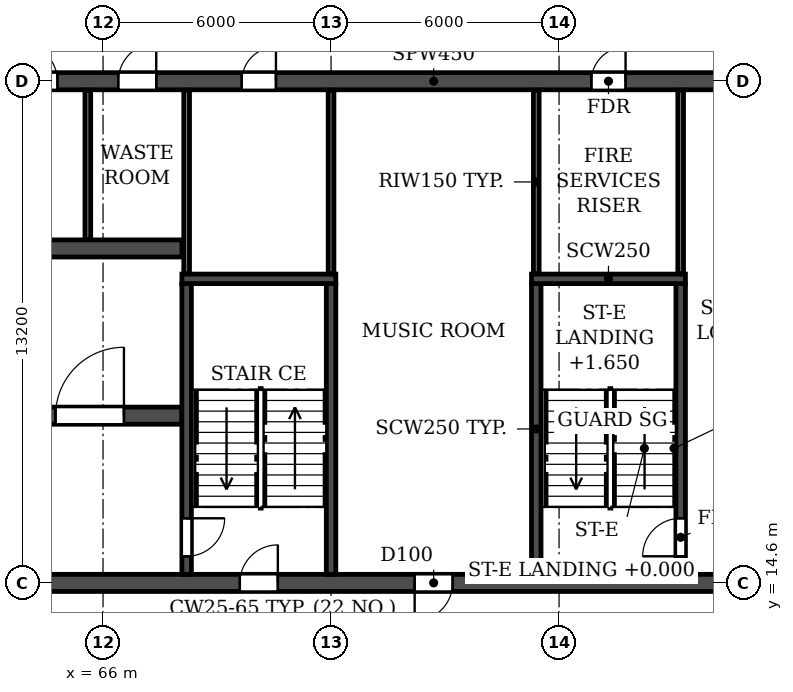
"""IFC4 building model, lengths in metres.
Left out: names, types, materials, properties, quantities, classifications, styles, units other than length and angle.
Written with IfcOpenShell. Run it as: python <this file> out.ifc"""

import sys

from ifc_helpers import new_model, si_unit, direction, frame, frame_2d, origin, place, context, subcontext, project, spatial, rectangle, extrude, element, fill, save


model = new_model("IFC4")
c1 = context("Model", 3, precision=1e-05, world=origin(), true_north=direction((0.0, 1.0)))
c2 = subcontext(c1, "Body", "Model", "MODEL_VIEW")
j1 = project(units=[si_unit("LENGTHUNIT", "METRE"), si_unit("PLANEANGLEUNIT", "RADIAN")], contexts=[c1])
p1 = place(None, origin())
s1 = spatial("IfcSite", under=j1, at=p1, CompositionType="ELEMENT")
p2 = place(p1, origin())
s2 = spatial("IfcBuilding", under=s1, at=p2, CompositionType="ELEMENT")
p3 = place(p2, frame((0.0, 0.0, 155.4)))
s3 = spatial("IfcBuildingStorey", under=s2, at=p3, CompositionType="ELEMENT", Elevation=155.4)
p4 = place(p3, frame((12.2, 14.6, 0.0), z_axis=(0.0, 0.0, 1.0), x_axis=(1.0, 0.0, 0.0)))
e1 = element("IfcWall", 1, at=p4, inside=s3, PredefinedType="SOLIDWALL", context=c2, shape_type="SweptSolid", body=[
    extrude(rectangle(XDim=77.6, YDim=0.45, at=frame_2d((38.8, 0.0))), origin(), (0.0, 0.0, 1.0), 3.0),
])
p5 = place(p4, frame((2.3, 0.0, 0.0)))
e2 = element("IfcOpeningElement", 2, at=p5, cuts=e1, PredefinedType="OPENING", context=c2, shape_type="SweptSolid", body=[
    extrude(rectangle(XDim=1.0, YDim=2.1, at=frame_2d((0.5, 1.05))), frame((0.0, 0.235, 0.0), z_axis=(0.0, -1.0, 0.0), x_axis=(1.0, 0.0, 0.0)), (0.0, 0.0, 1.0), 0.47),
])
p6 = place(p4, frame((6.7, 0.0, 0.0)))
e3 = element("IfcOpeningElement", 3, at=p6, cuts=e1, PredefinedType="OPENING", context=c2, shape_type="SweptSolid", body=[
    extrude(rectangle(XDim=1.0, YDim=2.1, at=frame_2d((0.5, 1.05))), frame((0.0, 0.235, 0.0), z_axis=(0.0, -1.0, 0.0), x_axis=(1.0, 0.0, 0.0)), (0.0, 0.0, 1.0), 0.47),
])
p7 = place(p4, frame((14.6, 0.0, 0.0)))
e4 = element("IfcOpeningElement", 4, at=p7, cuts=e1, PredefinedType="OPENING", context=c2, shape_type="SweptSolid", body=[
    extrude(rectangle(XDim=1.0, YDim=2.1, at=frame_2d((0.5, 1.05))), frame((0.0, 0.235, 0.0), z_axis=(0.0, -1.0, 0.0), x_axis=(1.0, 0.0, 0.0)), (0.0, 0.0, 1.0), 0.47),
])
p8 = place(p4, frame((19.2, 0.0, 0.0)))
e5 = element("IfcOpeningElement", 5, at=p8, cuts=e1, PredefinedType="OPENING", context=c2, shape_type="SweptSolid", body=[
    extrude(rectangle(XDim=1.0, YDim=2.1, at=frame_2d((0.5, 1.05))), frame((0.0, 0.235, 0.0), z_axis=(0.0, -1.0, 0.0), x_axis=(1.0, 0.0, 0.0)), (0.0, 0.0, 1.0), 0.47),
])
p9 = place(p4, frame((30.5, 0.0, 0.0)))
e6 = element("IfcOpeningElement", 6, at=p9, cuts=e1, PredefinedType="OPENING", context=c2, shape_type="SweptSolid", body=[
    extrude(rectangle(XDim=1.0, YDim=2.1, at=frame_2d((0.5, 1.05))), frame((0.0, 0.235, 0.0), z_axis=(0.0, -1.0, 0.0), x_axis=(1.0, 0.0, 0.0)), (0.0, 0.0, 1.0), 0.47),
])
p10 = place(p4, frame((34.15, 0.0, 0.0)))
e7 = element("IfcOpeningElement", 7, at=p10, cuts=e1, PredefinedType="OPENING", context=c2, shape_type="SweptSolid", body=[
    extrude(rectangle(XDim=1.5, YDim=2.1, at=frame_2d((0.75, 1.05))), frame((0.0, 0.235, 0.0), z_axis=(0.0, -1.0, 0.0), x_axis=(1.0, 0.0, 0.0)), (0.0, 0.0, 1.0), 0.47),
])
p11 = place(p4, frame((38.3, 0.0, 0.0)))
e8 = element("IfcOpeningElement", 8, at=p11, cuts=e1, PredefinedType="OPENING", context=c2, shape_type="SweptSolid", body=[
    extrude(rectangle(XDim=1.0, YDim=2.1, at=frame_2d((0.5, 1.05))), frame((0.0, 0.235, 0.0), z_axis=(0.0, -1.0, 0.0), x_axis=(1.0, 0.0, 0.0)), (0.0, 0.0, 1.0), 0.47),
])
p12 = place(p4, frame((43.5, 0.0, 0.0)))
e9 = element("IfcOpeningElement", 9, at=p12, cuts=e1, PredefinedType="OPENING", context=c2, shape_type="SweptSolid", body=[
    extrude(rectangle(XDim=1.0, YDim=2.1, at=frame_2d((0.5, 1.05))), frame((0.0, 0.235, 0.0), z_axis=(0.0, -1.0, 0.0), x_axis=(1.0, 0.0, 0.0)), (0.0, 0.0, 1.0), 0.47),
])
p13 = place(p4, frame((57.4, 0.0, 0.0)))
e10 = element("IfcOpeningElement", 10, at=p13, cuts=e1, PredefinedType="OPENING", context=c2, shape_type="SweptSolid", body=[
    extrude(rectangle(XDim=1.0, YDim=2.1, at=frame_2d((0.5, 1.05))), frame((0.0, 0.235, 0.0), z_axis=(0.0, -1.0, 0.0), x_axis=(1.0, 0.0, 0.0)), (0.0, 0.0, 1.0), 0.47),
])
p14 = place(p4, frame((62.0, 0.0, 0.0)))
e11 = element("IfcOpeningElement", 11, at=p14, cuts=e1, PredefinedType="OPENING", context=c2, shape_type="SweptSolid", body=[
    extrude(rectangle(XDim=1.0, YDim=2.1, at=frame_2d((0.5, 1.05))), frame((0.0, 0.235, 0.0), z_axis=(0.0, -1.0, 0.0), x_axis=(1.0, 0.0, 0.0)), (0.0, 0.0, 1.0), 0.47),
])
p15 = place(p4, frame((69.9, 0.0, 0.0)))
e12 = element("IfcOpeningElement", 12, at=p15, cuts=e1, PredefinedType="OPENING", context=c2, shape_type="SweptSolid", body=[
    extrude(rectangle(XDim=1.0, YDim=2.1, at=frame_2d((0.5, 1.05))), frame((0.0, 0.235, 0.0), z_axis=(0.0, -1.0, 0.0), x_axis=(1.0, 0.0, 0.0)), (0.0, 0.0, 1.0), 0.47),
])
p16 = place(p4, frame((74.3, 0.0, 0.0)))
e13 = element("IfcOpeningElement", 13, at=p16, cuts=e1, PredefinedType="OPENING", context=c2, shape_type="SweptSolid", body=[
    extrude(rectangle(XDim=1.0, YDim=2.1, at=frame_2d((0.5, 1.05))), frame((0.0, 0.235, 0.0), z_axis=(0.0, -1.0, 0.0), x_axis=(1.0, 0.0, 0.0)), (0.0, 0.0, 1.0), 0.47),
])
p17 = place(p3, frame((12.2, 27.8, 0.0), z_axis=(0.0, 0.0, 1.0), x_axis=(1.0, 0.0, 0.0)))
e14 = element("IfcWall", 14, at=p17, inside=s3, PredefinedType="SOLIDWALL", context=c2, shape_type="SweptSolid", body=[
    extrude(rectangle(XDim=77.6, YDim=0.45, at=frame_2d((38.8, 0.0))), origin(), (0.0, 0.0, 1.0), 3.0),
])
p18 = place(p17, frame((2.3, 0.0, 0.0)))
e15 = element("IfcOpeningElement", 15, at=p18, cuts=e14, PredefinedType="OPENING", context=c2, shape_type="SweptSolid", body=[
    extrude(rectangle(XDim=1.0, YDim=2.1, at=frame_2d((0.5, 1.05))), frame((0.0, 0.235, 0.0), z_axis=(0.0, -1.0, 0.0), x_axis=(1.0, 0.0, 0.0)), (0.0, 0.0, 1.0), 0.47),
])
p19 = place(p17, frame((6.7, 0.0, 0.0)))
e16 = element("IfcOpeningElement", 16, at=p19, cuts=e14, PredefinedType="OPENING", context=c2, shape_type="SweptSolid", body=[
    extrude(rectangle(XDim=1.0, YDim=2.1, at=frame_2d((0.5, 1.05))), frame((0.0, 0.235, 0.0), z_axis=(0.0, -1.0, 0.0), x_axis=(1.0, 0.0, 0.0)), (0.0, 0.0, 1.0), 0.47),
])
p20 = place(p17, frame((10.05, 0.0, 0.0)))
e17 = element("IfcOpeningElement", 17, at=p20, cuts=e14, PredefinedType="OPENING", context=c2, shape_type="SweptSolid", body=[
    extrude(rectangle(XDim=0.9, YDim=2.1, at=frame_2d((0.45, 1.05))), frame((0.0, 0.235, 0.0), z_axis=(0.0, -1.0, 0.0), x_axis=(1.0, 0.0, 0.0)), (0.0, 0.0, 1.0), 0.47),
])
p21 = place(p17, frame((19.25, 0.0, 0.0)))
e18 = element("IfcOpeningElement", 18, at=p21, cuts=e14, PredefinedType="OPENING", context=c2, shape_type="SweptSolid", body=[
    extrude(rectangle(XDim=0.9, YDim=2.1, at=frame_2d((0.45, 1.05))), frame((0.0, 0.235, 0.0), z_axis=(0.0, -1.0, 0.0), x_axis=(1.0, 0.0, 0.0)), (0.0, 0.0, 1.0), 0.47),
])
p22 = place(p17, frame((22.4, 0.0, 0.0)))
e19 = element("IfcOpeningElement", 19, at=p22, cuts=e14, PredefinedType="OPENING", context=c2, shape_type="SweptSolid", body=[
    extrude(rectangle(XDim=1.0, YDim=2.1, at=frame_2d((0.5, 1.05))), frame((0.0, 0.235, 0.0), z_axis=(0.0, -1.0, 0.0), x_axis=(1.0, 0.0, 0.0)), (0.0, 0.0, 1.0), 0.47),
])
p23 = place(p17, frame((27.6, 0.0, 0.0)))
e20 = element("IfcOpeningElement", 20, at=p23, cuts=e14, PredefinedType="OPENING", context=c2, shape_type="SweptSolid", body=[
    extrude(rectangle(XDim=1.0, YDim=2.1, at=frame_2d((0.5, 1.05))), frame((0.0, 0.235, 0.0), z_axis=(0.0, -1.0, 0.0), x_axis=(1.0, 0.0, 0.0)), (0.0, 0.0, 1.0), 0.47),
])
p24 = place(p17, frame((35.4, 0.0, 0.0)))
e21 = element("IfcOpeningElement", 21, at=p24, cuts=e14, PredefinedType="OPENING", context=c2, shape_type="SweptSolid", body=[
    extrude(rectangle(XDim=1.0, YDim=2.1, at=frame_2d((0.5, 1.05))), frame((0.0, 0.235, 0.0), z_axis=(0.0, -1.0, 0.0), x_axis=(1.0, 0.0, 0.0)), (0.0, 0.0, 1.0), 0.47),
])
p25 = place(p17, frame((38.3, 0.0, 0.0)))
e22 = element("IfcOpeningElement", 22, at=p25, cuts=e14, PredefinedType="OPENING", context=c2, shape_type="SweptSolid", body=[
    extrude(rectangle(XDim=1.0, YDim=2.1, at=frame_2d((0.5, 1.05))), frame((0.0, 0.235, 0.0), z_axis=(0.0, -1.0, 0.0), x_axis=(1.0, 0.0, 0.0)), (0.0, 0.0, 1.0), 0.47),
])
p26 = place(p17, frame((42.25, 0.0, 0.0)))
e23 = element("IfcOpeningElement", 23, at=p26, cuts=e14, PredefinedType="OPENING", context=c2, shape_type="SweptSolid", body=[
    extrude(rectangle(XDim=1.5, YDim=2.1, at=frame_2d((0.75, 1.05))), frame((0.0, 0.235, 0.0), z_axis=(0.0, -1.0, 0.0), x_axis=(1.0, 0.0, 0.0)), (0.0, 0.0, 1.0), 0.47),
])
p27 = place(p17, frame((47.7, 0.0, 0.0)))
e24 = element("IfcOpeningElement", 24, at=p27, cuts=e14, PredefinedType="OPENING", context=c2, shape_type="SweptSolid", body=[
    extrude(rectangle(XDim=1.0, YDim=2.1, at=frame_2d((0.5, 1.05))), frame((0.0, 0.235, 0.0), z_axis=(0.0, -1.0, 0.0), x_axis=(1.0, 0.0, 0.0)), (0.0, 0.0, 1.0), 0.47),
])
p28 = place(p17, frame((51.6, 0.0, 0.0)))
e25 = element("IfcOpeningElement", 25, at=p28, cuts=e14, PredefinedType="OPENING", context=c2, shape_type="SweptSolid", body=[
    extrude(rectangle(XDim=1.0, YDim=2.1, at=frame_2d((0.5, 1.05))), frame((0.0, 0.235, 0.0), z_axis=(0.0, -1.0, 0.0), x_axis=(1.0, 0.0, 0.0)), (0.0, 0.0, 1.0), 0.47),
])
p29 = place(p17, frame((54.2, 0.0, 0.0)))
e26 = element("IfcOpeningElement", 26, at=p29, cuts=e14, PredefinedType="OPENING", context=c2, shape_type="SweptSolid", body=[
    extrude(rectangle(XDim=1.0, YDim=2.1, at=frame_2d((0.5, 1.05))), frame((0.0, 0.235, 0.0), z_axis=(0.0, -1.0, 0.0), x_axis=(1.0, 0.0, 0.0)), (0.0, 0.0, 1.0), 0.47),
])
p30 = place(p17, frame((57.45, 0.0, 0.0)))
e27 = element("IfcOpeningElement", 27, at=p30, cuts=e14, PredefinedType="OPENING", context=c2, shape_type="SweptSolid", body=[
    extrude(rectangle(XDim=0.9, YDim=2.1, at=frame_2d((0.45, 1.05))), frame((0.0, 0.235, 0.0), z_axis=(0.0, -1.0, 0.0), x_axis=(1.0, 0.0, 0.0)), (0.0, 0.0, 1.0), 0.47),
])
p31 = place(p17, frame((66.65, 0.0, 0.0)))
e28 = element("IfcOpeningElement", 28, at=p31, cuts=e14, PredefinedType="OPENING", context=c2, shape_type="SweptSolid", body=[
    extrude(rectangle(XDim=0.9, YDim=2.1, at=frame_2d((0.45, 1.05))), frame((0.0, 0.235, 0.0), z_axis=(0.0, -1.0, 0.0), x_axis=(1.0, 0.0, 0.0)), (0.0, 0.0, 1.0), 0.47),
])
p32 = place(p17, frame((69.9, 0.0, 0.0)))
e29 = element("IfcOpeningElement", 29, at=p32, cuts=e14, PredefinedType="OPENING", context=c2, shape_type="SweptSolid", body=[
    extrude(rectangle(XDim=1.0, YDim=2.1, at=frame_2d((0.5, 1.05))), frame((0.0, 0.235, 0.0), z_axis=(0.0, -1.0, 0.0), x_axis=(1.0, 0.0, 0.0)), (0.0, 0.0, 1.0), 0.47),
])
p33 = place(p17, frame((74.3, 0.0, 0.0)))
e30 = element("IfcOpeningElement", 30, at=p33, cuts=e14, PredefinedType="OPENING", context=c2, shape_type="SweptSolid", body=[
    extrude(rectangle(XDim=1.0, YDim=2.1, at=frame_2d((0.5, 1.05))), frame((0.0, 0.235, 0.0), z_axis=(0.0, -1.0, 0.0), x_axis=(1.0, 0.0, 0.0)), (0.0, 0.0, 1.0), 0.47),
])
p34 = place(p3, frame((33.925, 19.0, 0.0), z_axis=(0.0, 0.0, 1.0), x_axis=(1.0, 0.0, 0.0)))
e31 = element("IfcWall", 31, at=p34, inside=s3, PredefinedType="SOLIDWALL", context=c2, shape_type="SweptSolid", body=[
    extrude(rectangle(XDim=34.15, YDim=0.45, at=frame_2d((17.075, 0.0))), origin(), (0.0, 0.0, 1.0), 3.0),
])
p35 = place(p34, frame((16.175, 0.0, 0.0)))
e32 = element("IfcOpeningElement", 32, at=p35, cuts=e31, PredefinedType="OPENING", context=c2, shape_type="SweptSolid", body=[
    extrude(rectangle(XDim=1.8, YDim=2.1, at=frame_2d((0.9, 1.05))), frame((0.0, 0.235, 0.0), z_axis=(0.0, -1.0, 0.0), x_axis=(1.0, 0.0, 0.0)), (0.0, 0.0, 1.0), 0.47),
])
p36 = place(p34, frame((1.525, 0.0, 0.0)))
e33 = element("IfcOpeningElement", 33, at=p36, cuts=e31, PredefinedType="OPENING", context=c2, shape_type="SweptSolid", body=[
    extrude(rectangle(XDim=1.8, YDim=2.1, at=frame_2d((0.9, 1.05))), frame((0.0, 0.235, 0.0), z_axis=(0.0, -1.0, 0.0), x_axis=(1.0, 0.0, 0.0)), (0.0, 0.0, 1.0), 0.47),
])
p37 = place(p34, frame((30.825, 0.0, 0.0)))
e34 = element("IfcOpeningElement", 34, at=p37, cuts=e31, PredefinedType="OPENING", context=c2, shape_type="SweptSolid", body=[
    extrude(rectangle(XDim=1.8, YDim=2.1, at=frame_2d((0.9, 1.05))), frame((0.0, 0.235, 0.0), z_axis=(0.0, -1.0, 0.0), x_axis=(1.0, 0.0, 0.0)), (0.0, 0.0, 1.0), 0.47),
])
p38 = place(p3, frame((33.925, 23.4, 0.0), z_axis=(0.0, 0.0, 1.0), x_axis=(1.0, 0.0, 0.0)))
e35 = element("IfcWall", 35, at=p38, inside=s3, PredefinedType="SOLIDWALL", context=c2, shape_type="SweptSolid", body=[
    extrude(rectangle(XDim=34.15, YDim=0.45, at=frame_2d((17.075, 0.0))), origin(), (0.0, 0.0, 1.0), 3.0),
])
p39 = place(p38, frame((16.175, 0.0, 0.0)))
e36 = element("IfcOpeningElement", 36, at=p39, cuts=e35, PredefinedType="OPENING", context=c2, shape_type="SweptSolid", body=[
    extrude(rectangle(XDim=1.8, YDim=2.1, at=frame_2d((0.9, 1.05))), frame((0.0, 0.235, 0.0), z_axis=(0.0, -1.0, 0.0), x_axis=(1.0, 0.0, 0.0)), (0.0, 0.0, 1.0), 0.47),
])
p40 = place(p38, frame((0.625, 0.0, 0.0)))
e37 = element("IfcOpeningElement", 37, at=p40, cuts=e35, PredefinedType="OPENING", context=c2, shape_type="SweptSolid", body=[
    extrude(rectangle(XDim=1.1, YDim=2.1, at=frame_2d((0.55, 1.05))), frame((0.0, 0.235, 0.0), z_axis=(0.0, -1.0, 0.0), x_axis=(1.0, 0.0, 0.0)), (0.0, 0.0, 1.0), 0.47),
])
p41 = place(p38, frame((3.225, 0.0, 0.0)))
e38 = element("IfcOpeningElement", 38, at=p41, cuts=e35, PredefinedType="OPENING", context=c2, shape_type="SweptSolid", body=[
    extrude(rectangle(XDim=1.1, YDim=2.1, at=frame_2d((0.55, 1.05))), frame((0.0, 0.235, 0.0), z_axis=(0.0, -1.0, 0.0), x_axis=(1.0, 0.0, 0.0)), (0.0, 0.0, 1.0), 0.47),
])
p42 = place(p38, frame((5.825, 0.0, 0.0)))
e39 = element("IfcOpeningElement", 39, at=p42, cuts=e35, PredefinedType="OPENING", context=c2, shape_type="SweptSolid", body=[
    extrude(rectangle(XDim=1.1, YDim=2.1, at=frame_2d((0.55, 1.05))), frame((0.0, 0.235, 0.0), z_axis=(0.0, -1.0, 0.0), x_axis=(1.0, 0.0, 0.0)), (0.0, 0.0, 1.0), 0.47),
])
p43 = place(p38, frame((8.425, 0.0, 0.0)))
e40 = element("IfcOpeningElement", 40, at=p43, cuts=e35, PredefinedType="OPENING", context=c2, shape_type="SweptSolid", body=[
    extrude(rectangle(XDim=1.1, YDim=2.1, at=frame_2d((0.55, 1.05))), frame((0.0, 0.235, 0.0), z_axis=(0.0, -1.0, 0.0), x_axis=(1.0, 0.0, 0.0)), (0.0, 0.0, 1.0), 0.47),
])
p44 = place(p38, frame((11.025, 0.0, 0.0)))
e41 = element("IfcOpeningElement", 41, at=p44, cuts=e35, PredefinedType="OPENING", context=c2, shape_type="SweptSolid", body=[
    extrude(rectangle(XDim=1.1, YDim=2.1, at=frame_2d((0.55, 1.05))), frame((0.0, 0.235, 0.0), z_axis=(0.0, -1.0, 0.0), x_axis=(1.0, 0.0, 0.0)), (0.0, 0.0, 1.0), 0.47),
])
p45 = place(p38, frame((13.625, 0.0, 0.0)))
e42 = element("IfcOpeningElement", 42, at=p45, cuts=e35, PredefinedType="OPENING", context=c2, shape_type="SweptSolid", body=[
    extrude(rectangle(XDim=1.1, YDim=2.1, at=frame_2d((0.55, 1.05))), frame((0.0, 0.235, 0.0), z_axis=(0.0, -1.0, 0.0), x_axis=(1.0, 0.0, 0.0)), (0.0, 0.0, 1.0), 0.47),
])
p46 = place(p38, frame((27.225, 0.0, 0.0)))
e43 = element("IfcOpeningElement", 43, at=p46, cuts=e35, PredefinedType="OPENING", context=c2, shape_type="SweptSolid", body=[
    extrude(rectangle(XDim=1.1, YDim=2.1, at=frame_2d((0.55, 1.05))), frame((0.0, 0.235, 0.0), z_axis=(0.0, -1.0, 0.0), x_axis=(1.0, 0.0, 0.0)), (0.0, 0.0, 1.0), 0.47),
])
p47 = place(p3, frame((68.2, 14.825, 0.0), z_axis=(0.0, 0.0, 1.0), x_axis=(0.0, 1.0, 0.0)))
e44 = element("IfcWall", 44, at=p47, inside=s3, PredefinedType="SOLIDWALL", context=c2, shape_type="SweptSolid", body=[
    extrude(rectangle(XDim=7.65, YDim=0.25, at=frame_2d((3.825, 0.0))), origin(), (0.0, 0.0, 1.0), 3.0),
])
p48 = place(p47, frame((0.475, 0.0, 0.0)))
e45 = element("IfcOpeningElement", 45, at=p48, cuts=e44, PredefinedType="OPENING", context=c2, shape_type="SweptSolid", body=[
    extrude(rectangle(XDim=1.0, YDim=2.1, at=frame_2d((0.5, 1.05))), frame((0.0, 0.135, 0.0), z_axis=(0.0, -1.0, 0.0), x_axis=(1.0, 0.0, 0.0)), (0.0, 0.0, 1.0), 0.27),
])
p49 = place(p3, frame((72.0, 14.825, 0.0), z_axis=(0.0, 0.0, 1.0), x_axis=(0.0, 1.0, 0.0)))
e46 = element("IfcWall", 46, at=p49, inside=s3, PredefinedType="SOLIDWALL", context=c2, shape_type="SweptSolid", body=[
    extrude(rectangle(XDim=7.65, YDim=0.25, at=frame_2d((3.825, 0.0))), origin(), (0.0, 0.0, 1.0), 3.0),
])
p50 = place(p3, frame((68.075, 22.6, 0.0), z_axis=(0.0, 0.0, 1.0), x_axis=(1.0, 0.0, 0.0)))
e47 = element("IfcWall", 47, at=p50, inside=s3, PredefinedType="SOLIDWALL", context=c2, shape_type="SweptSolid", body=[
    extrude(rectangle(XDim=4.05, YDim=0.25, at=frame_2d((2.025, 0.0))), origin(), (0.0, 0.0, 1.0), 3.0),
])
p51 = place(p3, frame((77.4, 14.825, 0.0), z_axis=(0.0, 0.0, 1.0), x_axis=(0.0, 1.0, 0.0)))
e48 = element("IfcWall", 48, at=p51, inside=s3, PredefinedType="SOLIDWALL", context=c2, shape_type="SweptSolid", body=[
    extrude(rectangle(XDim=7.65, YDim=0.25, at=frame_2d((3.825, 0.0))), origin(), (0.0, 0.0, 1.0), 3.0),
])
p52 = place(p3, frame((81.2, 14.825, 0.0), z_axis=(0.0, 0.0, 1.0), x_axis=(0.0, 1.0, 0.0)))
e49 = element("IfcWall", 49, at=p52, inside=s3, PredefinedType="SOLIDWALL", context=c2, shape_type="SweptSolid", body=[
    extrude(rectangle(XDim=7.65, YDim=0.25, at=frame_2d((3.825, 0.0))), origin(), (0.0, 0.0, 1.0), 3.0),
])
p53 = place(p52, frame((0.475, 0.0, 0.0)))
e50 = element("IfcOpeningElement", 50, at=p53, cuts=e49, PredefinedType="OPENING", context=c2, shape_type="SweptSolid", body=[
    extrude(rectangle(XDim=1.0, YDim=2.1, at=frame_2d((0.5, 1.05))), frame((0.0, 0.135, 0.0), z_axis=(0.0, -1.0, 0.0), x_axis=(1.0, 0.0, 0.0)), (0.0, 0.0, 1.0), 0.27),
])
p54 = place(p3, frame((77.275, 22.6, 0.0), z_axis=(0.0, 0.0, 1.0), x_axis=(1.0, 0.0, 0.0)))
e51 = element("IfcWall", 51, at=p54, inside=s3, PredefinedType="SOLIDWALL", context=c2, shape_type="SweptSolid", body=[
    extrude(rectangle(XDim=4.05, YDim=0.25, at=frame_2d((2.025, 0.0))), origin(), (0.0, 0.0, 1.0), 3.0),
])
p55 = place(p3, frame((65.6, 23.635, 0.0), z_axis=(0.0, 0.0, 1.0), x_axis=(0.0, 1.0, 0.0)))
e52 = element("IfcWall", 52, at=p55, inside=s3, PredefinedType="PARTITIONING", context=c2, shape_type="SweptSolid", body=[
    extrude(rectangle(XDim=3.93, YDim=0.15, at=frame_2d((1.965, 0.0))), origin(), (0.0, 0.0, 1.0), 3.0),
])
for number, where, z_axis, x_axis in (
    (53, (68.2, 22.735, 0.0), (0.0, 0.0, 1.0), (0.0, 1.0, 0.0)),
    (54, (72.0, 22.735, 0.0), (0.0, 0.0, 1.0), (0.0, 1.0, 0.0)),
    (55, (77.4, 22.735, 0.0), (0.0, 0.0, 1.0), (0.0, 1.0, 0.0)),
    (56, (81.2, 22.735, 0.0), (0.0, 0.0, 1.0), (0.0, 1.0, 0.0)),
):
    element("IfcWall", number, at=place(p3, frame(where, z_axis=z_axis, x_axis=x_axis)), inside=s3, PredefinedType="PARTITIONING", context=c2, shape_type="SweptSolid", body=[
        extrude(rectangle(XDim=4.83, YDim=0.15, at=frame_2d((2.415, 0.0))), origin(), (0.0, 0.0, 1.0), 3.0),
    ])
p56 = place(p28, origin())
e57 = element("IfcDoor", 57, at=p56, inside=s3, OperationType="SINGLE_SWING_LEFT", PredefinedType="DOOR", context=c2, shape_type="SweptSolid", body=[
    extrude(rectangle(XDim=1.0, YDim=2.1, at=frame_2d((0.5, 1.05))), frame((0.0, 0.025, 0.0), z_axis=(0.0, -1.0, 0.0), x_axis=(1.0, 0.0, 0.0)), (0.0, 0.0, 1.0), 0.05),
])
fill(e25, e57)
p57 = place(p29, origin())
e58 = element("IfcDoor", 58, at=p57, inside=s3, OperationType="SINGLE_SWING_RIGHT", PredefinedType="DOOR", context=c2, shape_type="SweptSolid", body=[
    extrude(rectangle(XDim=1.0, YDim=2.1, at=frame_2d((0.5, 1.05))), frame((0.0, 0.025, 0.0), z_axis=(0.0, -1.0, 0.0), x_axis=(1.0, 0.0, 0.0)), (0.0, 0.0, 1.0), 0.05),
])
fill(e26, e58)
p58 = place(p30, origin())
e59 = element("IfcDoor", 59, at=p58, inside=s3, OperationType="SINGLE_SWING_RIGHT", PredefinedType="DOOR", context=c2, shape_type="SweptSolid", body=[
    extrude(rectangle(XDim=0.9, YDim=2.1, at=frame_2d((0.45, 1.05))), frame((0.0, 0.025, 0.0), z_axis=(0.0, -1.0, 0.0), x_axis=(1.0, 0.0, 0.0)), (0.0, 0.0, 1.0), 0.05),
])
fill(e27, e59)
p59 = place(p31, origin())
e60 = element("IfcDoor", 60, at=p59, inside=s3, OperationType="SINGLE_SWING_RIGHT", PredefinedType="DOOR", context=c2, shape_type="SweptSolid", body=[
    extrude(rectangle(XDim=0.9, YDim=2.1, at=frame_2d((0.45, 1.05))), frame((0.0, 0.025, 0.0), z_axis=(0.0, -1.0, 0.0), x_axis=(1.0, 0.0, 0.0)), (0.0, 0.0, 1.0), 0.05),
])
fill(e28, e60)
p60 = place(p13, origin())
e61 = element("IfcDoor", 61, at=p60, inside=s3, OperationType="SINGLE_SWING_RIGHT", PredefinedType="DOOR", context=c2, shape_type="SweptSolid", body=[
    extrude(rectangle(XDim=1.0, YDim=2.1, at=frame_2d((0.5, 1.05))), frame((0.0, 0.025, 0.0), z_axis=(0.0, -1.0, 0.0), x_axis=(1.0, 0.0, 0.0)), (0.0, 0.0, 1.0), 0.05),
])
fill(e10, e61)
p61 = place(p14, frame((1.0, 0.0, 0.0), z_axis=(0.0, 0.0, 1.0), x_axis=(-1.0, 0.0, 0.0)))
e62 = element("IfcDoor", 62, at=p61, inside=s3, OperationType="SINGLE_SWING_RIGHT", PredefinedType="DOOR", context=c2, shape_type="SweptSolid", body=[
    extrude(rectangle(XDim=1.0, YDim=2.1, at=frame_2d((0.5, 1.05))), frame((0.0, 0.025, 0.0), z_axis=(0.0, -1.0, 0.0), x_axis=(1.0, 0.0, 0.0)), (0.0, 0.0, 1.0), 0.05),
])
fill(e11, e62)
p62 = place(p48, frame((1.0, 0.0, 0.0), z_axis=(0.0, 0.0, 1.0), x_axis=(-1.0, 0.0, 0.0)))
e63 = element("IfcDoor", 63, at=p62, inside=s3, OperationType="SINGLE_SWING_LEFT", PredefinedType="DOOR", context=c2, shape_type="SweptSolid", body=[
    extrude(rectangle(XDim=1.0, YDim=2.1, at=frame_2d((0.5, 1.05))), frame((0.0, 0.025, 0.0), z_axis=(0.0, -1.0, 0.0), x_axis=(1.0, 0.0, 0.0)), (0.0, 0.0, 1.0), 0.05),
])
fill(e45, e63)
p63 = place(p37, origin())
e64 = element("IfcDoor", 64, at=p63, inside=s3, OperationType="DOUBLE_DOOR_SINGLE_SWING", PredefinedType="DOOR", context=c2, shape_type="SweptSolid", body=[
    extrude(rectangle(XDim=1.8, YDim=2.1, at=frame_2d((0.9, 1.05))), frame((0.0, 0.025, 0.0), z_axis=(0.0, -1.0, 0.0), x_axis=(1.0, 0.0, 0.0)), (0.0, 0.0, 1.0), 0.05),
])
fill(e34, e64)
p64 = place(p53, origin())
e65 = element("IfcDoor", 65, at=p64, inside=s3, OperationType="SINGLE_SWING_LEFT", PredefinedType="DOOR", context=c2, shape_type="SweptSolid", body=[
    extrude(rectangle(XDim=1.0, YDim=2.1, at=frame_2d((0.5, 1.05))), frame((0.0, 0.025, 0.0), z_axis=(0.0, -1.0, 0.0), x_axis=(1.0, 0.0, 0.0)), (0.0, 0.0, 1.0), 0.05),
])
fill(e50, e65)
save(model, sys.argv[1])
